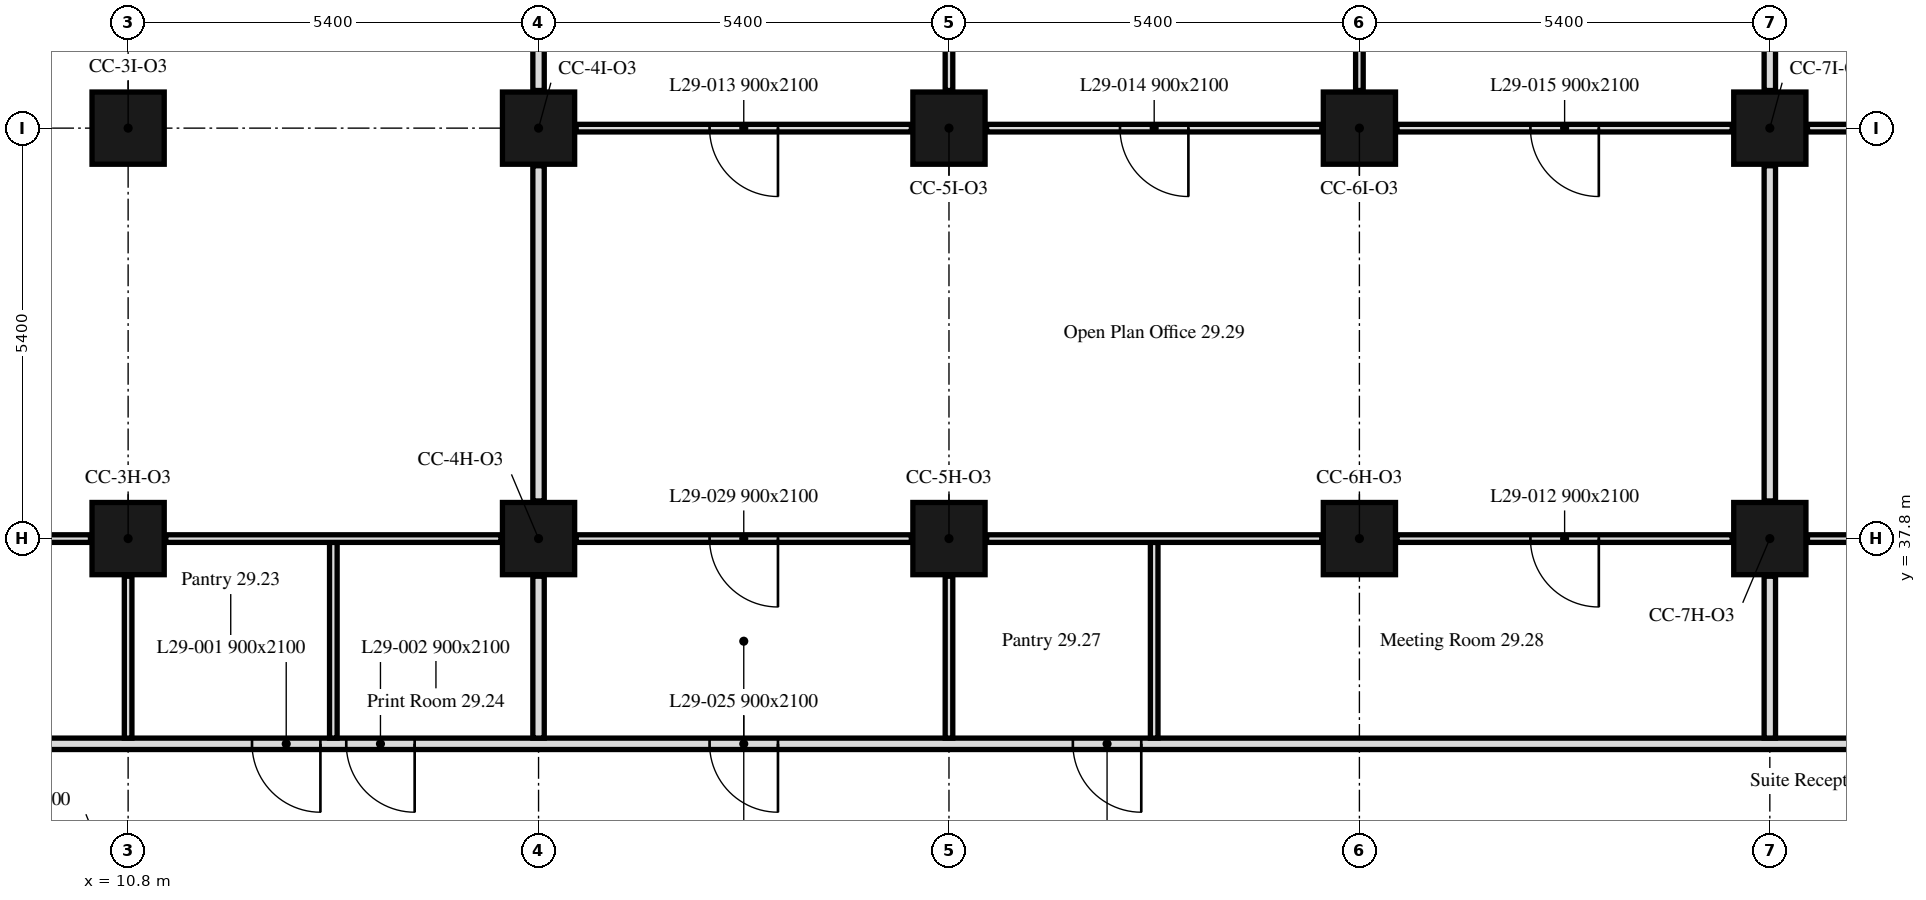
"""IFC4 building model, lengths in metres.
Left out: names, types, materials, properties, quantities, classifications, styles, units other than length and angle.
Written with IfcOpenShell. Run it as: python <this file> out.ifc"""

import sys

from ifc_helpers import new_model, si_unit, direction, frame, frame_2d, origin, origin_2d, place, context, subcontext, project, spatial, rectangle, extrude, element, fill, save


model = new_model("IFC4")
c1 = context("Model", 3, precision=1e-05, world=origin(), true_north=direction((0.0, 1.0)))
c2 = subcontext(c1, "Body", "Model", "MODEL_VIEW")
j1 = project(units=[si_unit("LENGTHUNIT", "METRE"), si_unit("PLANEANGLEUNIT", "RADIAN")], contexts=[c1])
p1 = place(None, origin())
s1 = spatial("IfcSite", under=j1, at=p1, CompositionType="ELEMENT")
p2 = place(p1, origin())
s2 = spatial("IfcBuilding", under=s1, at=p2, CompositionType="ELEMENT")
p3 = place(p2, frame((0.0, 0.0, 122.0)))
s3 = spatial("IfcBuildingStorey", under=s2, at=p3, CompositionType="ELEMENT", Elevation=122.0)
for number, where, z_axis, x_axis in (
    (1, (10.8, 37.8, 0.0), (0.0, 0.0, 1.0), (1.0, 0.0, 0.0)),
    (2, (16.2, 37.8, 0.0), (0.0, 0.0, 1.0), (1.0, 0.0, 0.0)),
    (3, (21.6, 37.8, 0.0), (0.0, 0.0, 1.0), (1.0, 0.0, 0.0)),
    (4, (27.0, 37.8, 0.0), (0.0, 0.0, 1.0), (1.0, 0.0, 0.0)),
    (5, (32.4, 37.8, 0.0), (0.0, 0.0, 1.0), (1.0, 0.0, 0.0)),
    (6, (10.8, 43.2, 0.0), (0.0, 0.0, 1.0), (1.0, 0.0, 0.0)),
    (7, (16.2, 43.2, 0.0), (0.0, 0.0, 1.0), (1.0, 0.0, 0.0)),
    (8, (21.6, 43.2, 0.0), (0.0, 0.0, 1.0), (1.0, 0.0, 0.0)),
    (9, (27.0, 43.2, 0.0), (0.0, 0.0, 1.0), (1.0, 0.0, 0.0)),
    (10, (32.4, 43.2, 0.0), (0.0, 0.0, 1.0), (1.0, 0.0, 0.0)),
):
    element("IfcColumn", number, at=place(p3, frame(where, z_axis=z_axis, x_axis=x_axis)), inside=s3, PredefinedType="COLUMN", context=c2, shape_type="SweptSolid", body=[
        extrude(rectangle(XDim=0.95, YDim=0.95, at=origin_2d()), origin(), (0.0, 0.0, 1.0), 3.3),
    ])
p4 = place(p3, frame((42.449, 35.1, 0.0), z_axis=(0.0, 0.0, 1.0), x_axis=(-1.0, 0.0, 0.0)))
e11 = element("IfcWall", 11, at=p4, inside=s3, PredefinedType="PARTITIONING", context=c2, shape_type="SweptSolid", body=[
    extrude(rectangle(XDim=41.698, YDim=0.15, at=frame_2d((20.849, 0.0))), origin(), (0.0, 0.0, 1.0), 2.55),
])
p5 = place(p4, frame((29.119, 0.0, 0.0)))
e12 = element("IfcOpeningElement", 12, at=p5, cuts=e11, PredefinedType="OPENING", context=c2, shape_type="SweptSolid", body=[
    extrude(rectangle(XDim=0.9, YDim=2.1, at=frame_2d((0.45, 1.05))), frame((0.0, 0.075, 0.0), z_axis=(0.0, -1.0, 0.0), x_axis=(1.0, 0.0, 0.0)), (0.0, 0.0, 1.0), 0.15),
])
p6 = place(p4, frame((27.879, 0.0, 0.0)))
e13 = element("IfcOpeningElement", 13, at=p6, cuts=e11, PredefinedType="OPENING", context=c2, shape_type="SweptSolid", body=[
    extrude(rectangle(XDim=0.9, YDim=2.1, at=frame_2d((0.45, 1.05))), frame((0.0, 0.075, 0.0), z_axis=(0.0, -1.0, 0.0), x_axis=(1.0, 0.0, 0.0)), (0.0, 0.0, 1.0), 0.15),
])
p7 = place(p4, frame((18.319, 0.0, 0.0)))
e14 = element("IfcOpeningElement", 14, at=p7, cuts=e11, PredefinedType="OPENING", context=c2, shape_type="SweptSolid", body=[
    extrude(rectangle(XDim=0.9, YDim=2.1, at=frame_2d((0.45, 1.05))), frame((0.0, 0.075, 0.0), z_axis=(0.0, -1.0, 0.0), x_axis=(1.0, 0.0, 0.0)), (0.0, 0.0, 1.0), 0.15),
])
p8 = place(p4, frame((38.624, 0.0, 0.0)))
e15 = element("IfcOpeningElement", 15, at=p8, cuts=e11, PredefinedType="OPENING", context=c2, shape_type="SweptSolid", body=[
    extrude(rectangle(XDim=0.9, YDim=2.1, at=frame_2d((0.45, 1.05))), frame((0.0, 0.075, 0.0), z_axis=(0.0, -1.0, 0.0), x_axis=(1.0, 0.0, 0.0)), (0.0, 0.0, 1.0), 0.15),
])
p9 = place(p4, frame((23.099, 0.0, 0.0)))
e16 = element("IfcOpeningElement", 16, at=p9, cuts=e11, PredefinedType="OPENING", context=c2, shape_type="SweptSolid", body=[
    extrude(rectangle(XDim=0.9, YDim=2.1, at=frame_2d((0.45, 1.05))), frame((0.0, 0.075, 0.0), z_axis=(0.0, -1.0, 0.0), x_axis=(1.0, 0.0, 0.0)), (0.0, 0.0, 1.0), 0.15),
])
p10 = place(p4, frame((6.899, 0.0, 0.0)))
e17 = element("IfcOpeningElement", 17, at=p10, cuts=e11, PredefinedType="OPENING", context=c2, shape_type="SweptSolid", body=[
    extrude(rectangle(XDim=0.9, YDim=2.1, at=frame_2d((0.45, 1.05))), frame((0.0, 0.075, 0.0), z_axis=(0.0, -1.0, 0.0), x_axis=(1.0, 0.0, 0.0)), (0.0, 0.0, 1.0), 0.15),
])
p11 = place(p3, frame((10.8, 35.175, 0.0), z_axis=(0.0, 0.0, 1.0), x_axis=(0.0, 1.0, 0.0)))
e18 = element("IfcWall", 18, at=p11, inside=s3, PredefinedType="PARTITIONING", context=c2, shape_type="SweptSolid", body=[
    extrude(rectangle(XDim=2.13, YDim=0.1, at=frame_2d((1.065, 0.0))), origin(), (0.0, 0.0, 1.0), 2.55),
])
p12 = place(p3, frame((10.305, 37.8, 0.0), z_axis=(0.0, 0.0, 1.0), x_axis=(-1.0, 0.0, 0.0)))
e19 = element("IfcWall", 19, at=p12, inside=s3, PredefinedType="PARTITIONING", context=c2, shape_type="SweptSolid", body=[
    extrude(rectangle(XDim=4.41, YDim=0.1, at=frame_2d((2.205, 0.0))), origin(), (0.0, 0.0, 1.0), 2.55),
])
p13 = place(p12, frame((1.755, 0.0, 0.0)))
e20 = element("IfcOpeningElement", 20, at=p13, cuts=e19, PredefinedType="OPENING", context=c2, shape_type="SweptSolid", body=[
    extrude(rectangle(XDim=0.9, YDim=2.1, at=frame_2d((0.45, 1.05))), frame((0.0, 0.05, 0.0), z_axis=(0.0, -1.0, 0.0), x_axis=(1.0, 0.0, 0.0)), (0.0, 0.0, 1.0), 0.1),
])
p14 = place(p3, frame((13.5, 35.175, 0.0), z_axis=(0.0, 0.0, 1.0), x_axis=(0.0, 1.0, 0.0)))
e21 = element("IfcWall", 21, at=p14, inside=s3, PredefinedType="PARTITIONING", context=c2, shape_type="SweptSolid", body=[
    extrude(rectangle(XDim=2.575, YDim=0.1, at=frame_2d((1.288, 0.0))), origin(), (0.0, 0.0, 1.0), 3.3),
])
p15 = place(p3, frame((16.2, 35.175, 0.0), z_axis=(0.0, 0.0, 1.0), x_axis=(0.0, 1.0, 0.0)))
e22 = element("IfcWall", 22, at=p15, inside=s3, PredefinedType="PARTITIONING", context=c2, shape_type="SweptSolid", body=[
    extrude(rectangle(XDim=2.13, YDim=0.15, at=frame_2d((1.065, 0.0))), origin(), (0.0, 0.0, 1.0), 2.55),
])
p16 = place(p3, frame((15.705, 37.8, 0.0), z_axis=(0.0, 0.0, 1.0), x_axis=(-1.0, 0.0, 0.0)))
e23 = element("IfcWall", 23, at=p16, inside=s3, PredefinedType="PARTITIONING", context=c2, shape_type="SweptSolid", body=[
    extrude(rectangle(XDim=4.41, YDim=0.1, at=frame_2d((2.205, 0.0))), origin(), (0.0, 0.0, 1.0), 2.55),
])
p17 = place(p3, frame((16.2, 38.295, 0.0), z_axis=(0.0, 0.0, 1.0), x_axis=(0.0, 1.0, 0.0)))
e24 = element("IfcWall", 24, at=p17, inside=s3, PredefinedType="PARTITIONING", context=c2, shape_type="SweptSolid", body=[
    extrude(rectangle(XDim=4.41, YDim=0.15, at=frame_2d((2.205, 0.0))), origin(), (0.0, 0.0, 1.0), 2.55),
])
p18 = place(p3, frame((16.2, 43.695, 0.0), z_axis=(0.0, 0.0, 1.0), x_axis=(0.0, 1.0, 0.0)))
e25 = element("IfcWall", 25, at=p18, inside=s3, PredefinedType="PARTITIONING", context=c2, shape_type="SweptSolid", body=[
    extrude(rectangle(XDim=4.154, YDim=0.15, at=frame_2d((2.077, 0.0))), origin(), (0.0, 0.0, 1.0), 2.55),
])
p19 = place(p3, frame((21.6, 35.175, 0.0), z_axis=(0.0, 0.0, 1.0), x_axis=(0.0, 1.0, 0.0)))
e26 = element("IfcWall", 26, at=p19, inside=s3, PredefinedType="PARTITIONING", context=c2, shape_type="SweptSolid", body=[
    extrude(rectangle(XDim=2.13, YDim=0.1, at=frame_2d((1.065, 0.0))), origin(), (0.0, 0.0, 1.0), 2.55),
])
p20 = place(p3, frame((21.105, 37.8, 0.0), z_axis=(0.0, 0.0, 1.0), x_axis=(-1.0, 0.0, 0.0)))
e27 = element("IfcWall", 27, at=p20, inside=s3, PredefinedType="PARTITIONING", context=c2, shape_type="SweptSolid", body=[
    extrude(rectangle(XDim=4.41, YDim=0.1, at=frame_2d((2.205, 0.0))), origin(), (0.0, 0.0, 1.0), 3.3),
])
p21 = place(p20, frame((1.755, 0.0, 0.0)))
e28 = element("IfcOpeningElement", 28, at=p21, cuts=e27, PredefinedType="OPENING", context=c2, shape_type="SweptSolid", body=[
    extrude(rectangle(XDim=0.9, YDim=2.1, at=frame_2d((0.45, 1.05))), frame((0.0, 0.05, 0.0), z_axis=(0.0, -1.0, 0.0), x_axis=(1.0, 0.0, 0.0)), (0.0, 0.0, 1.0), 0.1),
])
p22 = place(p3, frame((24.3, 35.175, 0.0), z_axis=(0.0, 0.0, 1.0), x_axis=(0.0, 1.0, 0.0)))
e29 = element("IfcWall", 29, at=p22, inside=s3, PredefinedType="PARTITIONING", context=c2, shape_type="SweptSolid", body=[
    extrude(rectangle(XDim=2.575, YDim=0.1, at=frame_2d((1.288, 0.0))), origin(), (0.0, 0.0, 1.0), 3.3),
])
p23 = place(p3, frame((32.4, 35.175, 0.0), z_axis=(0.0, 0.0, 1.0), x_axis=(0.0, 1.0, 0.0)))
e30 = element("IfcWall", 30, at=p23, inside=s3, PredefinedType="PARTITIONING", context=c2, shape_type="SweptSolid", body=[
    extrude(rectangle(XDim=2.13, YDim=0.15, at=frame_2d((1.065, 0.0))), origin(), (0.0, 0.0, 1.0), 2.55),
])
p24 = place(p3, frame((31.905, 37.8, 0.0), z_axis=(0.0, 0.0, 1.0), x_axis=(-1.0, 0.0, 0.0)))
e31 = element("IfcWall", 31, at=p24, inside=s3, PredefinedType="PARTITIONING", context=c2, shape_type="SweptSolid", body=[
    extrude(rectangle(XDim=4.41, YDim=0.1, at=frame_2d((2.205, 0.0))), origin(), (0.0, 0.0, 1.0), 3.3),
])
p25 = place(p24, frame((1.755, 0.0, 0.0)))
e32 = element("IfcOpeningElement", 32, at=p25, cuts=e31, PredefinedType="OPENING", context=c2, shape_type="SweptSolid", body=[
    extrude(rectangle(XDim=0.9, YDim=2.1, at=frame_2d((0.45, 1.05))), frame((0.0, 0.05, 0.0), z_axis=(0.0, -1.0, 0.0), x_axis=(1.0, 0.0, 0.0)), (0.0, 0.0, 1.0), 0.1),
])
p26 = place(p3, frame((26.505, 37.8, 0.0), z_axis=(0.0, 0.0, 1.0), x_axis=(-1.0, 0.0, 0.0)))
e33 = element("IfcWall", 33, at=p26, inside=s3, PredefinedType="PARTITIONING", context=c2, shape_type="SweptSolid", body=[
    extrude(rectangle(XDim=4.41, YDim=0.1, at=frame_2d((2.205, 0.0))), origin(), (0.0, 0.0, 1.0), 3.3),
])
p27 = place(p3, frame((32.4, 38.295, 0.0), z_axis=(0.0, 0.0, 1.0), x_axis=(0.0, 1.0, 0.0)))
e34 = element("IfcWall", 34, at=p27, inside=s3, PredefinedType="PARTITIONING", context=c2, shape_type="SweptSolid", body=[
    extrude(rectangle(XDim=4.41, YDim=0.15, at=frame_2d((2.205, 0.0))), origin(), (0.0, 0.0, 1.0), 2.55),
])
p28 = place(p3, frame((31.905, 43.2, 0.0), z_axis=(0.0, 0.0, 1.0), x_axis=(-1.0, 0.0, 0.0)))
e35 = element("IfcWall", 35, at=p28, inside=s3, PredefinedType="PARTITIONING", context=c2, shape_type="SweptSolid", body=[
    extrude(rectangle(XDim=4.41, YDim=0.1, at=frame_2d((2.205, 0.0))), origin(), (0.0, 0.0, 1.0), 3.3),
])
p29 = place(p28, frame((1.755, 0.0, 0.0)))
e36 = element("IfcOpeningElement", 36, at=p29, cuts=e35, PredefinedType="OPENING", context=c2, shape_type="SweptSolid", body=[
    extrude(rectangle(XDim=0.9, YDim=2.1, at=frame_2d((0.45, 1.05))), frame((0.0, 0.05, 0.0), z_axis=(0.0, -1.0, 0.0), x_axis=(1.0, 0.0, 0.0)), (0.0, 0.0, 1.0), 0.1),
])
p30 = place(p3, frame((26.505, 43.2, 0.0), z_axis=(0.0, 0.0, 1.0), x_axis=(-1.0, 0.0, 0.0)))
e37 = element("IfcWall", 37, at=p30, inside=s3, PredefinedType="PARTITIONING", context=c2, shape_type="SweptSolid", body=[
    extrude(rectangle(XDim=4.41, YDim=0.1, at=frame_2d((2.205, 0.0))), origin(), (0.0, 0.0, 1.0), 3.3),
])
p31 = place(p30, frame((1.755, 0.0, 0.0)))
e38 = element("IfcOpeningElement", 38, at=p31, cuts=e37, PredefinedType="OPENING", context=c2, shape_type="SweptSolid", body=[
    extrude(rectangle(XDim=0.9, YDim=2.1, at=frame_2d((0.45, 1.05))), frame((0.0, 0.05, 0.0), z_axis=(0.0, -1.0, 0.0), x_axis=(1.0, 0.0, 0.0)), (0.0, 0.0, 1.0), 0.1),
])
p32 = place(p3, frame((21.105, 43.2, 0.0), z_axis=(0.0, 0.0, 1.0), x_axis=(-1.0, 0.0, 0.0)))
e39 = element("IfcWall", 39, at=p32, inside=s3, PredefinedType="PARTITIONING", context=c2, shape_type="SweptSolid", body=[
    extrude(rectangle(XDim=4.41, YDim=0.1, at=frame_2d((2.205, 0.0))), origin(), (0.0, 0.0, 1.0), 3.3),
])
p33 = place(p32, frame((1.755, 0.0, 0.0)))
e40 = element("IfcOpeningElement", 40, at=p33, cuts=e39, PredefinedType="OPENING", context=c2, shape_type="SweptSolid", body=[
    extrude(rectangle(XDim=0.9, YDim=2.1, at=frame_2d((0.45, 1.05))), frame((0.0, 0.05, 0.0), z_axis=(0.0, -1.0, 0.0), x_axis=(1.0, 0.0, 0.0)), (0.0, 0.0, 1.0), 0.1),
])
for number, where, z_axis, x_axis in (
    (41, (21.6, 43.695, 0.0), (0.0, 0.0, 1.0), (0.0, 1.0, 0.0)),
    (42, (27.0, 43.695, 0.0), (0.0, 0.0, 1.0), (0.0, 1.0, 0.0)),
):
    element("IfcWall", number, at=place(p3, frame(where, z_axis=z_axis, x_axis=x_axis)), inside=s3, PredefinedType="PARTITIONING", context=c2, shape_type="SweptSolid", body=[
        extrude(rectangle(XDim=4.154, YDim=0.1, at=frame_2d((2.077, 0.0))), origin(), (0.0, 0.0, 1.0), 2.55),
    ])
p34 = place(p3, frame((32.4, 43.695, 0.0), z_axis=(0.0, 0.0, 1.0), x_axis=(0.0, 1.0, 0.0)))
e43 = element("IfcWall", 43, at=p34, inside=s3, PredefinedType="PARTITIONING", context=c2, shape_type="SweptSolid", body=[
    extrude(rectangle(XDim=4.154, YDim=0.15, at=frame_2d((2.077, 0.0))), origin(), (0.0, 0.0, 1.0), 2.55),
])
p35 = place(p3, frame((37.305, 37.8, 0.0), z_axis=(0.0, 0.0, 1.0), x_axis=(-1.0, 0.0, 0.0)))
e44 = element("IfcWall", 44, at=p35, inside=s3, PredefinedType="PARTITIONING", context=c2, shape_type="SweptSolid", body=[
    extrude(rectangle(XDim=4.41, YDim=0.1, at=frame_2d((2.205, 0.0))), origin(), (0.0, 0.0, 1.0), 3.3),
])
p36 = place(p35, frame((1.755, 0.0, 0.0)))
e45 = element("IfcOpeningElement", 45, at=p36, cuts=e44, PredefinedType="OPENING", context=c2, shape_type="SweptSolid", body=[
    extrude(rectangle(XDim=0.9, YDim=2.1, at=frame_2d((0.45, 1.05))), frame((0.0, 0.05, 0.0), z_axis=(0.0, -1.0, 0.0), x_axis=(1.0, 0.0, 0.0)), (0.0, 0.0, 1.0), 0.1),
])
p37 = place(p3, frame((37.305, 43.2, 0.0), z_axis=(0.0, 0.0, 1.0), x_axis=(-1.0, 0.0, 0.0)))
e46 = element("IfcWall", 46, at=p37, inside=s3, PredefinedType="PARTITIONING", context=c2, shape_type="SweptSolid", body=[
    extrude(rectangle(XDim=4.41, YDim=0.1, at=frame_2d((2.205, 0.0))), origin(), (0.0, 0.0, 1.0), 3.3),
])
p38 = place(p37, frame((1.755, 0.0, 0.0)))
e47 = element("IfcOpeningElement", 47, at=p38, cuts=e46, PredefinedType="OPENING", context=c2, shape_type="SweptSolid", body=[
    extrude(rectangle(XDim=0.9, YDim=2.1, at=frame_2d((0.45, 1.05))), frame((0.0, 0.05, 0.0), z_axis=(0.0, -1.0, 0.0), x_axis=(1.0, 0.0, 0.0)), (0.0, 0.0, 1.0), 0.1),
])
p39 = place(p5, origin())
e48 = element("IfcDoor", 48, at=p39, inside=s3, OperationType="SINGLE_SWING_LEFT", PredefinedType="DOOR", context=c2, shape_type="SweptSolid", body=[
    extrude(rectangle(XDim=0.9, YDim=2.1, at=frame_2d((0.45, 1.05))), frame((0.0, 0.025, 0.0), z_axis=(0.0, -1.0, 0.0), x_axis=(1.0, 0.0, 0.0)), (0.0, 0.0, 1.0), 0.05),
])
fill(e12, e48)
p40 = place(p6, origin())
e49 = element("IfcDoor", 49, at=p40, inside=s3, OperationType="SINGLE_SWING_LEFT", PredefinedType="DOOR", context=c2, shape_type="SweptSolid", body=[
    extrude(rectangle(XDim=0.9, YDim=2.1, at=frame_2d((0.45, 1.05))), frame((0.0, 0.025, 0.0), z_axis=(0.0, -1.0, 0.0), x_axis=(1.0, 0.0, 0.0)), (0.0, 0.0, 1.0), 0.05),
])
fill(e13, e49)
p41 = place(p7, origin())
e50 = element("IfcDoor", 50, at=p41, inside=s3, OperationType="SINGLE_SWING_LEFT", PredefinedType="DOOR", context=c2, shape_type="SweptSolid", body=[
    extrude(rectangle(XDim=0.9, YDim=2.1, at=frame_2d((0.45, 1.05))), frame((0.0, 0.025, 0.0), z_axis=(0.0, -1.0, 0.0), x_axis=(1.0, 0.0, 0.0)), (0.0, 0.0, 1.0), 0.05),
])
fill(e14, e50)
p42 = place(p25, origin())
e51 = element("IfcDoor", 51, at=p42, inside=s3, OperationType="SINGLE_SWING_RIGHT", PredefinedType="DOOR", context=c2, shape_type="SweptSolid", body=[
    extrude(rectangle(XDim=0.9, YDim=2.1, at=frame_2d((0.45, 1.05))), frame((0.0, 0.025, 0.0), z_axis=(0.0, -1.0, 0.0), x_axis=(1.0, 0.0, 0.0)), (0.0, 0.0, 1.0), 0.05),
])
fill(e32, e51)
p43 = place(p33, origin())
e52 = element("IfcDoor", 52, at=p43, inside=s3, OperationType="SINGLE_SWING_RIGHT", PredefinedType="DOOR", context=c2, shape_type="SweptSolid", body=[
    extrude(rectangle(XDim=0.9, YDim=2.1, at=frame_2d((0.45, 1.05))), frame((0.0, 0.025, 0.0), z_axis=(0.0, -1.0, 0.0), x_axis=(1.0, 0.0, 0.0)), (0.0, 0.0, 1.0), 0.05),
])
fill(e40, e52)
p44 = place(p31, origin())
e53 = element("IfcDoor", 53, at=p44, inside=s3, OperationType="SINGLE_SWING_RIGHT", PredefinedType="DOOR", context=c2, shape_type="SweptSolid", body=[
    extrude(rectangle(XDim=0.9, YDim=2.1, at=frame_2d((0.45, 1.05))), frame((0.0, 0.025, 0.0), z_axis=(0.0, -1.0, 0.0), x_axis=(1.0, 0.0, 0.0)), (0.0, 0.0, 1.0), 0.05),
])
fill(e38, e53)
p45 = place(p29, origin())
e54 = element("IfcDoor", 54, at=p45, inside=s3, OperationType="SINGLE_SWING_RIGHT", PredefinedType="DOOR", context=c2, shape_type="SweptSolid", body=[
    extrude(rectangle(XDim=0.9, YDim=2.1, at=frame_2d((0.45, 1.05))), frame((0.0, 0.025, 0.0), z_axis=(0.0, -1.0, 0.0), x_axis=(1.0, 0.0, 0.0)), (0.0, 0.0, 1.0), 0.05),
])
fill(e36, e54)
p46 = place(p9, origin())
e55 = element("IfcDoor", 55, at=p46, inside=s3, OperationType="SINGLE_SWING_LEFT", PredefinedType="DOOR", context=c2, shape_type="SweptSolid", body=[
    extrude(rectangle(XDim=0.9, YDim=2.1, at=frame_2d((0.45, 1.05))), frame((0.0, 0.025, 0.0), z_axis=(0.0, -1.0, 0.0), x_axis=(1.0, 0.0, 0.0)), (0.0, 0.0, 1.0), 0.05),
])
fill(e16, e55)
p47 = place(p21, origin())
e56 = element("IfcDoor", 56, at=p47, inside=s3, OperationType="SINGLE_SWING_LEFT", PredefinedType="DOOR", context=c2, shape_type="SweptSolid", body=[
    extrude(rectangle(XDim=0.9, YDim=2.1, at=frame_2d((0.45, 1.05))), frame((0.0, 0.025, 0.0), z_axis=(0.0, -1.0, 0.0), x_axis=(1.0, 0.0, 0.0)), (0.0, 0.0, 1.0), 0.05),
])
fill(e28, e56)
save(model, sys.argv[1])
